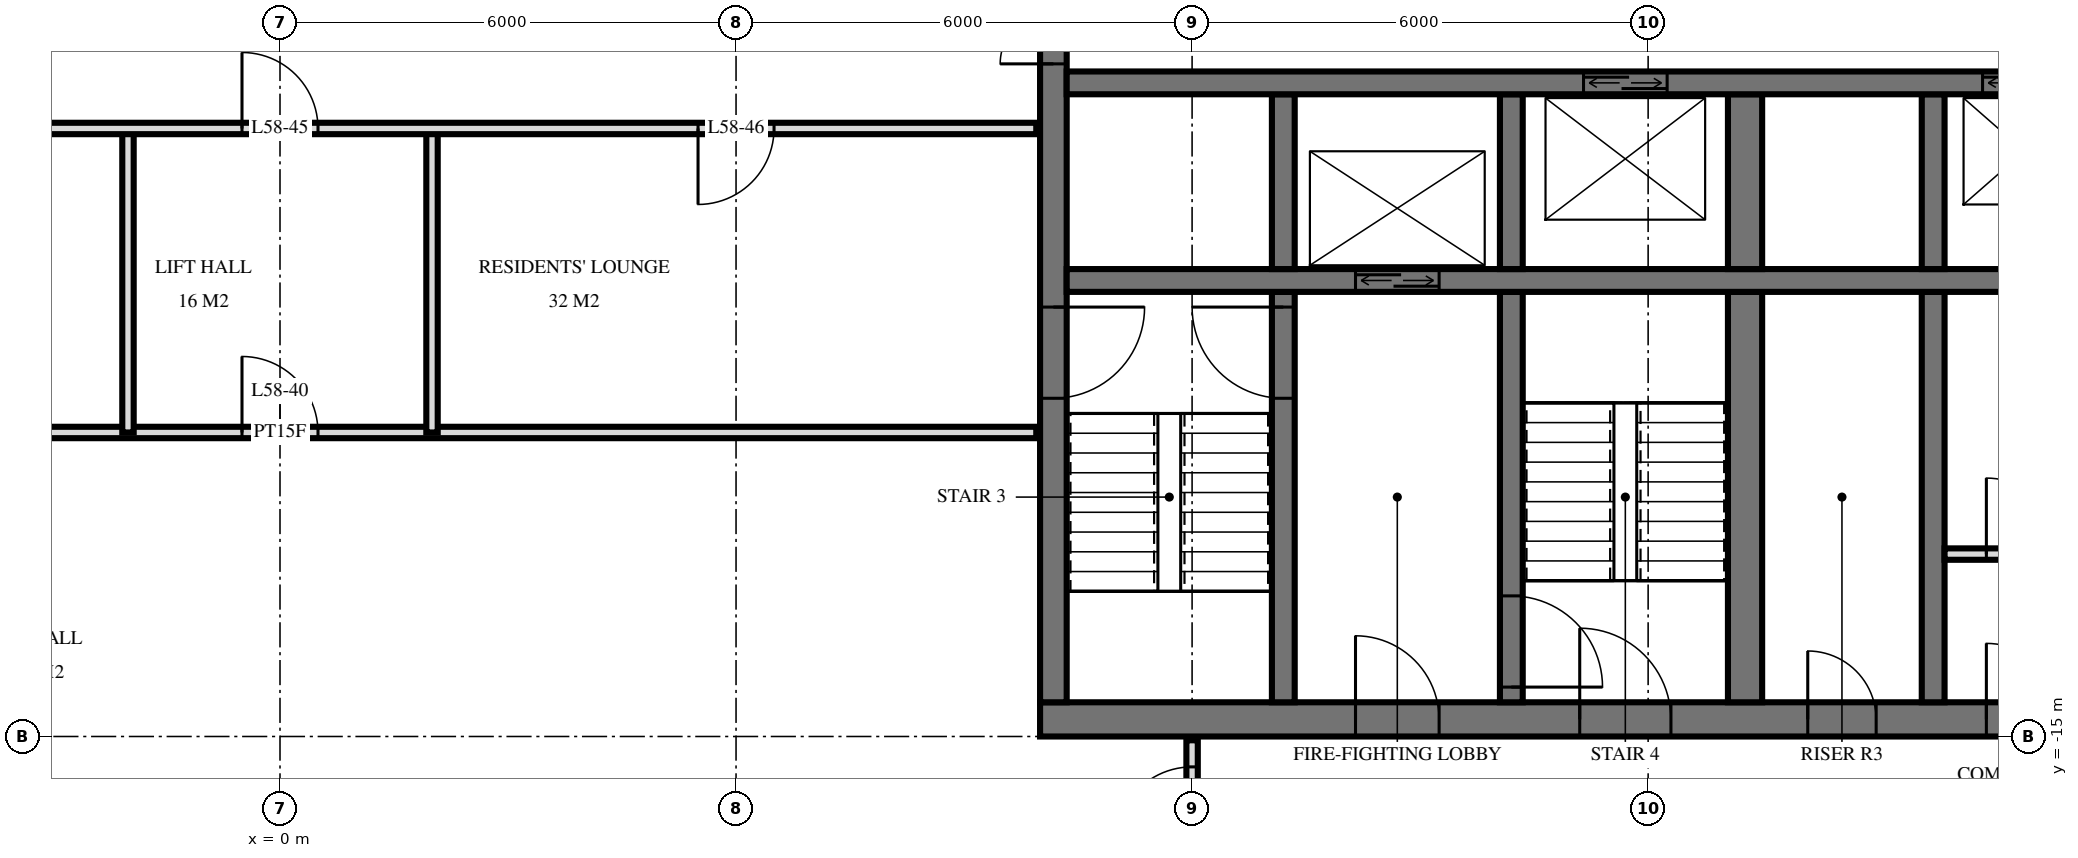
"""IFC4 building model, lengths in metres.
Left out: names, types, materials, properties, quantities, classifications, styles, units other than length and angle.
Written with IfcOpenShell. Run it as: python <this file> out.ifc"""

import sys

from ifc_helpers import new_model, si_unit, direction, frame, frame_2d, origin, place, context, subcontext, project, spatial, rectangle, extrude, element, fill, save


model = new_model("IFC4")
c1 = context("Model", 3, precision=1e-05, world=origin(), true_north=direction((0.0, 1.0)))
c2 = subcontext(c1, "Body", "Model", "MODEL_VIEW")
j1 = project(units=[si_unit("LENGTHUNIT", "METRE"), si_unit("PLANEANGLEUNIT", "RADIAN")], contexts=[c1])
p1 = place(None, origin())
s1 = spatial("IfcSite", under=j1, at=p1, CompositionType="ELEMENT")
p2 = place(p1, origin())
s2 = spatial("IfcBuilding", under=s1, at=p2, CompositionType="ELEMENT")
p3 = place(p2, frame((0.0, 0.0, 222.1)))
s3 = spatial("IfcBuildingStorey", under=s2, at=p3, CompositionType="ELEMENT", Elevation=222.1)
p4 = place(p3, frame((10.0, -14.775, 0.0), z_axis=(0.0, 0.0, 1.0), x_axis=(1.0, 0.0, 0.0)))
e1 = element("IfcWall", 1, at=p4, inside=s3, PredefinedType="SHEAR", context=c2, shape_type="SweptSolid", body=[
    extrude(rectangle(XDim=14.5, YDim=0.45, at=frame_2d((7.25, 0.0))), origin(), (0.0, 0.0, 1.0), 3.5),
])
p5 = place(p4, frame((7.1, 0.0, 0.0)))
e2 = element("IfcOpeningElement", 2, at=p5, cuts=e1, PredefinedType="OPENING", context=c2, shape_type="SweptSolid", body=[
    extrude(rectangle(XDim=1.2, YDim=2.1, at=frame_2d((0.6, 1.05))), frame((0.0, 0.235, 0.0), z_axis=(0.0, -1.0, 0.0), x_axis=(1.0, 0.0, 0.0)), (0.0, 0.0, 1.0), 0.47),
])
p6 = place(p4, frame((4.15, 0.0, 0.0)))
e3 = element("IfcOpeningElement", 3, at=p6, cuts=e1, PredefinedType="OPENING", context=c2, shape_type="SweptSolid", body=[
    extrude(rectangle(XDim=1.1, YDim=2.1, at=frame_2d((0.55, 1.05))), frame((0.0, 0.235, 0.0), z_axis=(0.0, -1.0, 0.0), x_axis=(1.0, 0.0, 0.0)), (0.0, 0.0, 1.0), 0.47),
])
p7 = place(p4, frame((10.1, 0.0, 0.0)))
e4 = element("IfcOpeningElement", 4, at=p7, cuts=e1, PredefinedType="OPENING", context=c2, shape_type="SweptSolid", body=[
    extrude(rectangle(XDim=0.9, YDim=2.1, at=frame_2d((0.45, 1.05))), frame((0.0, 0.235, 0.0), z_axis=(0.0, -1.0, 0.0), x_axis=(1.0, 0.0, 0.0)), (0.0, 0.0, 1.0), 0.47),
])
p8 = place(p4, frame((12.45, 0.0, 0.0)))
e5 = element("IfcOpeningElement", 5, at=p8, cuts=e1, PredefinedType="OPENING", context=c2, shape_type="SweptSolid", body=[
    extrude(rectangle(XDim=1.0, YDim=2.1, at=frame_2d((0.5, 1.05))), frame((0.0, 0.235, 0.0), z_axis=(0.0, -1.0, 0.0), x_axis=(1.0, 0.0, 0.0)), (0.0, 0.0, 1.0), 0.47),
])
p9 = place(p3, frame((10.175, -14.55, 0.0), z_axis=(0.0, 0.0, 1.0), x_axis=(0.0, 1.0, 0.0)))
e6 = element("IfcWall", 6, at=p9, inside=s3, PredefinedType="SHEAR", context=c2, shape_type="SweptSolid", body=[
    extrude(rectangle(XDim=14.1, YDim=0.35, at=frame_2d((7.05, 0.0))), origin(), (0.0, 0.0, 1.0), 3.5),
])
p10 = place(p9, frame((8.4, 0.0, 0.0)))
e7 = element("IfcOpeningElement", 7, at=p10, cuts=e6, PredefinedType="OPENING", context=c2, shape_type="SweptSolid", body=[
    extrude(rectangle(XDim=1.4, YDim=2.4, at=frame_2d((0.7, 1.2))), frame((0.0, 0.185, 0.0), z_axis=(0.0, -1.0, 0.0), x_axis=(1.0, 0.0, 0.0)), (0.0, 0.0, 1.0), 0.37),
])
p11 = place(p9, frame((10.0, 0.0, 0.0)))
e8 = element("IfcOpeningElement", 8, at=p11, cuts=e6, PredefinedType="OPENING", context=c2, shape_type="SweptSolid", body=[
    extrude(rectangle(XDim=1.4, YDim=2.4, at=frame_2d((0.7, 1.2))), frame((0.0, 0.185, 0.0), z_axis=(0.0, -1.0, 0.0), x_axis=(1.0, 0.0, 0.0)), (0.0, 0.0, 1.0), 0.37),
])
p12 = place(p9, frame((4.0, 0.0, 0.0)))
e9 = element("IfcOpeningElement", 9, at=p12, cuts=e6, PredefinedType="OPENING", context=c2, shape_type="SweptSolid", body=[
    extrude(rectangle(XDim=1.2, YDim=2.1, at=frame_2d((0.6, 1.05))), frame((0.0, 0.185, 0.0), z_axis=(0.0, -1.0, 0.0), x_axis=(1.0, 0.0, 0.0)), (0.0, 0.0, 1.0), 0.37),
])
p13 = place(p3, frame((10.35, -6.4, 0.0), z_axis=(0.0, 0.0, 1.0), x_axis=(1.0, 0.0, 0.0)))
e10 = element("IfcWall", 10, at=p13, inside=s3, PredefinedType="SHEAR", context=c2, shape_type="SweptSolid", body=[
    extrude(rectangle(XDim=13.7, YDim=0.3, at=frame_2d((6.85, 0.0))), origin(), (0.0, 0.0, 1.0), 3.5),
])
p14 = place(p13, frame((12.05, 0.0, 0.0)))
e11 = element("IfcOpeningElement", 11, at=p14, cuts=e10, PredefinedType="OPENING", context=c2, shape_type="SweptSolid", body=[
    extrude(rectangle(XDim=1.1, YDim=2.1, at=frame_2d((0.55, 1.05))), frame((0.0, 0.16, 0.0), z_axis=(0.0, -1.0, 0.0), x_axis=(1.0, 0.0, 0.0)), (0.0, 0.0, 1.0), 0.32),
])
p15 = place(p13, frame((6.8, 0.0, 0.0)))
e12 = element("IfcOpeningElement", 12, at=p15, cuts=e10, PredefinedType="OPENING", context=c2, shape_type="SweptSolid", body=[
    extrude(rectangle(XDim=1.1, YDim=2.1, at=frame_2d((0.55, 1.05))), frame((0.0, 0.16, 0.0), z_axis=(0.0, -1.0, 0.0), x_axis=(1.0, 0.0, 0.0)), (0.0, 0.0, 1.0), 0.32),
])
p16 = place(p3, frame((10.35, -9.0, 0.0), z_axis=(0.0, 0.0, 1.0), x_axis=(1.0, 0.0, 0.0)))
e13 = element("IfcWall", 13, at=p16, inside=s3, PredefinedType="SHEAR", context=c2, shape_type="SweptSolid", body=[
    extrude(rectangle(XDim=13.7, YDim=0.3, at=frame_2d((6.85, 0.0))), origin(), (0.0, 0.0, 1.0), 3.5),
])
p17 = place(p16, frame((3.8, 0.0, 0.0)))
e14 = element("IfcOpeningElement", 14, at=p17, cuts=e13, PredefinedType="OPENING", context=c2, shape_type="SweptSolid", body=[
    extrude(rectangle(XDim=1.1, YDim=2.1, at=frame_2d((0.55, 1.05))), frame((0.0, 0.16, 0.0), z_axis=(0.0, -1.0, 0.0), x_axis=(1.0, 0.0, 0.0)), (0.0, 0.0, 1.0), 0.32),
])
p18 = place(p3, frame((13.2, -8.85, 0.0), z_axis=(0.0, 0.0, 1.0), x_axis=(0.0, 1.0, 0.0)))
e15 = element("IfcWall", 15, at=p18, inside=s3, PredefinedType="SHEAR", context=c2, shape_type="SweptSolid", body=[
    extrude(rectangle(XDim=2.3, YDim=0.3, at=frame_2d((1.15, 0.0))), origin(), (0.0, 0.0, 1.0), 3.5),
])
p19 = place(p3, frame((13.2, -14.55, 0.0), z_axis=(0.0, 0.0, 1.0), x_axis=(0.0, 1.0, 0.0)))
e16 = element("IfcWall", 16, at=p19, inside=s3, PredefinedType="SHEAR", context=c2, shape_type="SweptSolid", body=[
    extrude(rectangle(XDim=5.4, YDim=0.3, at=frame_2d((2.7, 0.0))), origin(), (0.0, 0.0, 1.0), 3.5),
])
p20 = place(p19, frame((4.0, 0.0, 0.0)))
e17 = element("IfcOpeningElement", 17, at=p20, cuts=e16, PredefinedType="OPENING", context=c2, shape_type="SweptSolid", body=[
    extrude(rectangle(XDim=1.2, YDim=2.1, at=frame_2d((0.6, 1.05))), frame((0.0, 0.16, 0.0), z_axis=(0.0, -1.0, 0.0), x_axis=(1.0, 0.0, 0.0)), (0.0, 0.0, 1.0), 0.32),
])
p21 = place(p3, frame((16.2, -8.85, 0.0), z_axis=(0.0, 0.0, 1.0), x_axis=(0.0, 1.0, 0.0)))
e18 = element("IfcWall", 18, at=p21, inside=s3, PredefinedType="SHEAR", context=c2, shape_type="SweptSolid", body=[
    extrude(rectangle(XDim=2.3, YDim=0.3, at=frame_2d((1.15, 0.0))), origin(), (0.0, 0.0, 1.0), 3.5),
])
p22 = place(p3, frame((16.2, -14.55, 0.0), z_axis=(0.0, 0.0, 1.0), x_axis=(0.0, 1.0, 0.0)))
e19 = element("IfcWall", 19, at=p22, inside=s3, PredefinedType="SHEAR", context=c2, shape_type="SweptSolid", body=[
    extrude(rectangle(XDim=5.4, YDim=0.3, at=frame_2d((2.7, 0.0))), origin(), (0.0, 0.0, 1.0), 3.5),
])
p23 = place(p22, frame((0.2, 0.0, 0.0)))
e20 = element("IfcOpeningElement", 20, at=p23, cuts=e19, PredefinedType="OPENING", context=c2, shape_type="SweptSolid", body=[
    extrude(rectangle(XDim=1.2, YDim=2.1, at=frame_2d((0.6, 1.05))), frame((0.0, 0.16, 0.0), z_axis=(0.0, -1.0, 0.0), x_axis=(1.0, 0.0, 0.0)), (0.0, 0.0, 1.0), 0.32),
])
p24 = place(p3, frame((19.275, -8.85, 0.0), z_axis=(0.0, 0.0, 1.0), x_axis=(0.0, 1.0, 0.0)))
e21 = element("IfcWall", 21, at=p24, inside=s3, PredefinedType="SHEAR", context=c2, shape_type="SweptSolid", body=[
    extrude(rectangle(XDim=2.3, YDim=0.45, at=frame_2d((1.15, 0.0))), origin(), (0.0, 0.0, 1.0), 3.5),
])
p25 = place(p3, frame((19.275, -14.55, 0.0), z_axis=(0.0, 0.0, 1.0), x_axis=(0.0, 1.0, 0.0)))
e22 = element("IfcWall", 22, at=p25, inside=s3, PredefinedType="SHEAR", context=c2, shape_type="SweptSolid", body=[
    extrude(rectangle(XDim=5.4, YDim=0.45, at=frame_2d((2.7, 0.0))), origin(), (0.0, 0.0, 1.0), 3.5),
])
p26 = place(p3, frame((21.75, -8.85, 0.0), z_axis=(0.0, 0.0, 1.0), x_axis=(0.0, 1.0, 0.0)))
e23 = element("IfcWall", 23, at=p26, inside=s3, PredefinedType="SHEAR", context=c2, shape_type="SweptSolid", body=[
    extrude(rectangle(XDim=2.3, YDim=0.3, at=frame_2d((1.15, 0.0))), origin(), (0.0, 0.0, 1.0), 3.5),
])
p27 = place(p3, frame((21.75, -14.55, 0.0), z_axis=(0.0, 0.0, 1.0), x_axis=(0.0, 1.0, 0.0)))
e24 = element("IfcWall", 24, at=p27, inside=s3, PredefinedType="SHEAR", context=c2, shape_type="SweptSolid", body=[
    extrude(rectangle(XDim=5.4, YDim=0.3, at=frame_2d((2.7, 0.0))), origin(), (0.0, 0.0, 1.0), 3.5),
])
p28 = place(p3, frame((21.9, -12.6, 0.0), z_axis=(0.0, 0.0, 1.0), x_axis=(1.0, 0.0, 0.0)))
e25 = element("IfcWall", 25, at=p28, inside=s3, PredefinedType="PARTITIONING", context=c2, shape_type="SweptSolid", body=[
    extrude(rectangle(XDim=2.1, YDim=0.15, at=frame_2d((1.05, 0.0))), origin(), (0.0, 0.0, 1.0), 3.2),
])
p29 = place(p28, frame((0.55, 0.0, 0.0)))
e26 = element("IfcOpeningElement", 26, at=p29, cuts=e25, PredefinedType="OPENING", context=c2, shape_type="SweptSolid", body=[
    extrude(rectangle(XDim=1.0, YDim=2.1, at=frame_2d((0.5, 1.05))), frame((0.0, 0.085, 0.0), z_axis=(0.0, -1.0, 0.0), x_axis=(1.0, 0.0, 0.0)), (0.0, 0.0, 1.0), 0.17),
])
p30 = place(p3, frame((12.0, -16.8, 0.0), z_axis=(0.0, 0.0, 1.0), x_axis=(0.0, 1.0, 0.0)))
e27 = element("IfcWall", 27, at=p30, inside=s3, PredefinedType="PARTITIONING", context=c2, shape_type="SweptSolid", body=[
    extrude(rectangle(XDim=1.75, YDim=0.15, at=frame_2d((0.875, 0.0))), origin(), (0.0, 0.0, 1.0), 3.22),
])
p31 = place(p30, frame((0.4, 0.0, 0.0)))
e28 = element("IfcOpeningElement", 28, at=p31, cuts=e27, PredefinedType="OPENING", context=c2, shape_type="SweptSolid", body=[
    extrude(rectangle(XDim=1.0, YDim=2.1, at=frame_2d((0.5, 1.05))), frame((0.0, 0.085, 0.0), z_axis=(0.0, -1.0, 0.0), x_axis=(1.0, 0.0, 0.0)), (0.0, 0.0, 1.0), 0.17),
])
for number, where, z_axis, x_axis in (
    (29, (2.0, -11.0, 0.0), (0.0, 0.0, 1.0), (0.0, 1.0, 0.0)),
    (30, (-2.0, -11.0, 0.0), (0.0, 0.0, 1.0), (0.0, 1.0, 0.0)),
):
    element("IfcWall", number, at=place(p3, frame(where, z_axis=z_axis, x_axis=x_axis)), inside=s3, PredefinedType="PARTITIONING", context=c2, shape_type="SweptSolid", body=[
        extrude(rectangle(XDim=4.0, YDim=0.15, at=frame_2d((2.0, 0.0))), origin(), (0.0, 0.0, 1.0), 3.22),
    ])
p32 = place(p3, frame((-9.95, -11.0, 0.0), z_axis=(0.0, 0.0, 1.0), x_axis=(1.0, 0.0, 0.0)))
e31 = element("IfcWall", 31, at=p32, inside=s3, PredefinedType="PARTITIONING", context=c2, shape_type="SweptSolid", body=[
    extrude(rectangle(XDim=19.9, YDim=0.15, at=frame_2d((9.95, 0.0))), origin(), (0.0, 0.0, 1.0), 3.22),
])
p33 = place(p32, frame((9.45, 0.0, 0.0)))
e32 = element("IfcOpeningElement", 32, at=p33, cuts=e31, PredefinedType="OPENING", context=c2, shape_type="SweptSolid", body=[
    extrude(rectangle(XDim=1.0, YDim=2.1, at=frame_2d((0.5, 1.05))), frame((0.0, 0.085, 0.0), z_axis=(0.0, -1.0, 0.0), x_axis=(1.0, 0.0, 0.0)), (0.0, 0.0, 1.0), 0.17),
])
p34 = place(p32, frame((3.45, 0.0, 0.0)))
e33 = element("IfcOpeningElement", 33, at=p34, cuts=e31, PredefinedType="OPENING", context=c2, shape_type="SweptSolid", body=[
    extrude(rectangle(XDim=1.0, YDim=2.1, at=frame_2d((0.5, 1.05))), frame((0.0, 0.085, 0.0), z_axis=(0.0, -1.0, 0.0), x_axis=(1.0, 0.0, 0.0)), (0.0, 0.0, 1.0), 0.17),
])
p35 = place(p3, frame((-9.95, -7.0, 0.0), z_axis=(0.0, 0.0, 1.0), x_axis=(1.0, 0.0, 0.0)))
e34 = element("IfcWall", 34, at=p35, inside=s3, PredefinedType="PARTITIONING", context=c2, shape_type="SweptSolid", body=[
    extrude(rectangle(XDim=19.9, YDim=0.15, at=frame_2d((9.95, 0.0))), origin(), (0.0, 0.0, 1.0), 3.22),
])
p36 = place(p35, frame((9.45, 0.0, 0.0)))
e35 = element("IfcOpeningElement", 35, at=p36, cuts=e34, PredefinedType="OPENING", context=c2, shape_type="SweptSolid", body=[
    extrude(rectangle(XDim=1.0, YDim=2.1, at=frame_2d((0.5, 1.05))), frame((0.0, 0.085, 0.0), z_axis=(0.0, -1.0, 0.0), x_axis=(1.0, 0.0, 0.0)), (0.0, 0.0, 1.0), 0.17),
])
p37 = place(p35, frame((15.45, 0.0, 0.0)))
e36 = element("IfcOpeningElement", 36, at=p37, cuts=e34, PredefinedType="OPENING", context=c2, shape_type="SweptSolid", body=[
    extrude(rectangle(XDim=1.0, YDim=2.1, at=frame_2d((0.5, 1.05))), frame((0.0, 0.085, 0.0), z_axis=(0.0, -1.0, 0.0), x_axis=(1.0, 0.0, 0.0)), (0.0, 0.0, 1.0), 0.17),
])
p38 = place(p14, origin())
e37 = element("IfcDoor", 37, at=p38, inside=s3, OperationType="DOUBLE_DOOR_SLIDING", PredefinedType="USERDEFINED", context=c2, shape_type="SweptSolid", body=[
    extrude(rectangle(XDim=1.1, YDim=2.1, at=frame_2d((0.55, 1.05))), frame((0.0, 0.025, 0.0), z_axis=(0.0, -1.0, 0.0), x_axis=(1.0, 0.0, 0.0)), (0.0, 0.0, 1.0), 0.05),
])
fill(e11, e37)
p39 = place(p17, origin())
e38 = element("IfcDoor", 38, at=p39, inside=s3, OperationType="DOUBLE_DOOR_SLIDING", PredefinedType="USERDEFINED", context=c2, shape_type="SweptSolid", body=[
    extrude(rectangle(XDim=1.1, YDim=2.1, at=frame_2d((0.55, 1.05))), frame((0.0, 0.025, 0.0), z_axis=(0.0, -1.0, 0.0), x_axis=(1.0, 0.0, 0.0)), (0.0, 0.0, 1.0), 0.05),
])
fill(e14, e38)
p40 = place(p15, origin())
e39 = element("IfcDoor", 39, at=p40, inside=s3, OperationType="DOUBLE_DOOR_SLIDING", PredefinedType="USERDEFINED", context=c2, shape_type="SweptSolid", body=[
    extrude(rectangle(XDim=1.1, YDim=2.1, at=frame_2d((0.55, 1.05))), frame((0.0, 0.025, 0.0), z_axis=(0.0, -1.0, 0.0), x_axis=(1.0, 0.0, 0.0)), (0.0, 0.0, 1.0), 0.05),
])
fill(e12, e39)
p41 = place(p10, origin())
e40 = element("IfcDoor", 40, at=p41, inside=s3, OperationType="DOUBLE_DOOR_SINGLE_SWING", PredefinedType="DOOR", context=c2, shape_type="SweptSolid", body=[
    extrude(rectangle(XDim=1.4, YDim=2.4, at=frame_2d((0.7, 1.2))), frame((0.0, 0.025, 0.0), z_axis=(0.0, -1.0, 0.0), x_axis=(1.0, 0.0, 0.0)), (0.0, 0.0, 1.0), 0.05),
])
fill(e7, e40)
p42 = place(p12, frame((0.6, 0.0, 0.0), z_axis=(0.0, 0.0, 1.0), x_axis=(-1.0, 0.0, 0.0)))
e41 = element("IfcDoor", 41, at=p42, inside=s3, OperationType="SINGLE_SWING_RIGHT", PredefinedType="DOOR", context=c2, shape_type="SweptSolid", body=[
    extrude(rectangle(XDim=1.2, YDim=2.1, at=frame_2d((0.0, 1.05))), frame((0.0, -0.025, 0.0), z_axis=(0.0, 1.0, 0.0), x_axis=(-1.0, 0.0, 0.0)), (0.0, 0.0, 1.0), 0.05),
])
fill(e9, e41)
p43 = place(p5, origin())
e42 = element("IfcDoor", 42, at=p43, inside=s3, OperationType="SINGLE_SWING_RIGHT", PredefinedType="DOOR", context=c2, shape_type="SweptSolid", body=[
    extrude(rectangle(XDim=1.2, YDim=2.1, at=frame_2d((0.6, 1.05))), frame((0.0, 0.025, 0.0), z_axis=(0.0, -1.0, 0.0), x_axis=(1.0, 0.0, 0.0)), (0.0, 0.0, 1.0), 0.05),
])
fill(e2, e42)
p44 = place(p6, origin())
e43 = element("IfcDoor", 43, at=p44, inside=s3, OperationType="SINGLE_SWING_RIGHT", PredefinedType="DOOR", context=c2, shape_type="SweptSolid", body=[
    extrude(rectangle(XDim=1.1, YDim=2.1, at=frame_2d((0.55, 1.05))), frame((0.0, 0.025, 0.0), z_axis=(0.0, -1.0, 0.0), x_axis=(1.0, 0.0, 0.0)), (0.0, 0.0, 1.0), 0.05),
])
fill(e3, e43)
p45 = place(p7, origin())
e44 = element("IfcDoor", 44, at=p45, inside=s3, OperationType="SINGLE_SWING_RIGHT", PredefinedType="DOOR", context=c2, shape_type="SweptSolid", body=[
    extrude(rectangle(XDim=0.9, YDim=2.1, at=frame_2d((0.45, 1.05))), frame((0.0, 0.025, 0.0), z_axis=(0.0, -1.0, 0.0), x_axis=(1.0, 0.0, 0.0)), (0.0, 0.0, 1.0), 0.05),
])
fill(e4, e44)
p46 = place(p8, origin())
e45 = element("IfcDoor", 45, at=p46, inside=s3, OperationType="SINGLE_SWING_RIGHT", PredefinedType="DOOR", context=c2, shape_type="SweptSolid", body=[
    extrude(rectangle(XDim=1.0, YDim=2.1, at=frame_2d((0.5, 1.05))), frame((0.0, 0.025, 0.0), z_axis=(0.0, -1.0, 0.0), x_axis=(1.0, 0.0, 0.0)), (0.0, 0.0, 1.0), 0.05),
])
fill(e5, e45)
p47 = place(p20, origin())
e46 = element("IfcDoor", 46, at=p47, inside=s3, OperationType="SINGLE_SWING_LEFT", PredefinedType="DOOR", context=c2, shape_type="SweptSolid", body=[
    extrude(rectangle(XDim=1.2, YDim=2.1, at=frame_2d((0.6, 1.05))), frame((0.0, 0.025, 0.0), z_axis=(0.0, -1.0, 0.0), x_axis=(1.0, 0.0, 0.0)), (0.0, 0.0, 1.0), 0.05),
])
fill(e17, e46)
p48 = place(p23, frame((0.6, 0.0, 0.0), z_axis=(0.0, 0.0, 1.0), x_axis=(-1.0, 0.0, 0.0)))
e47 = element("IfcDoor", 47, at=p48, inside=s3, OperationType="SINGLE_SWING_LEFT", PredefinedType="DOOR", context=c2, shape_type="SweptSolid", body=[
    extrude(rectangle(XDim=1.2, YDim=2.1, at=frame_2d((0.0, 1.05))), frame((0.0, -0.025, 0.0), z_axis=(0.0, 1.0, 0.0), x_axis=(-1.0, 0.0, 0.0)), (0.0, 0.0, 1.0), 0.05),
])
fill(e20, e47)
p49 = place(p29, origin())
e48 = element("IfcDoor", 48, at=p49, inside=s3, OperationType="SINGLE_SWING_RIGHT", PredefinedType="DOOR", context=c2, shape_type="SweptSolid", body=[
    extrude(rectangle(XDim=1.0, YDim=2.1, at=frame_2d((0.5, 1.05))), frame((0.0, 0.025, 0.0), z_axis=(0.0, -1.0, 0.0), x_axis=(1.0, 0.0, 0.0)), (0.0, 0.0, 1.0), 0.05),
])
fill(e26, e48)
p50 = place(p31, origin())
e49 = element("IfcDoor", 49, at=p50, inside=s3, OperationType="SINGLE_SWING_RIGHT", PredefinedType="DOOR", context=c2, shape_type="SweptSolid", body=[
    extrude(rectangle(XDim=1.0, YDim=2.1, at=frame_2d((0.5, 1.05))), frame((0.0, 0.025, 0.0), z_axis=(0.0, -1.0, 0.0), x_axis=(1.0, 0.0, 0.0)), (0.0, 0.0, 1.0), 0.05),
])
fill(e28, e49)
p51 = place(p33, origin())
e50 = element("IfcDoor", 50, at=p51, inside=s3, OperationType="SINGLE_SWING_RIGHT", PredefinedType="DOOR", context=c2, shape_type="SweptSolid", body=[
    extrude(rectangle(XDim=1.0, YDim=2.1, at=frame_2d((0.5, 1.05))), frame((0.0, 0.025, 0.0), z_axis=(0.0, -1.0, 0.0), x_axis=(1.0, 0.0, 0.0)), (0.0, 0.0, 1.0), 0.05),
])
fill(e32, e50)
p52 = place(p36, origin())
e51 = element("IfcDoor", 51, at=p52, inside=s3, OperationType="SINGLE_SWING_RIGHT", PredefinedType="DOOR", context=c2, shape_type="SweptSolid", body=[
    extrude(rectangle(XDim=1.0, YDim=2.1, at=frame_2d((0.5, 1.05))), frame((0.0, 0.025, 0.0), z_axis=(0.0, -1.0, 0.0), x_axis=(1.0, 0.0, 0.0)), (0.0, 0.0, 1.0), 0.05),
])
fill(e35, e51)
p53 = place(p37, frame((0.5, 0.0, 0.0), z_axis=(0.0, 0.0, 1.0), x_axis=(-1.0, 0.0, 0.0)))
e52 = element("IfcDoor", 52, at=p53, inside=s3, OperationType="SINGLE_SWING_LEFT", PredefinedType="DOOR", context=c2, shape_type="SweptSolid", body=[
    extrude(rectangle(XDim=1.0, YDim=2.1, at=frame_2d((0.0, 1.05))), frame((0.0, -0.025, 0.0), z_axis=(0.0, 1.0, 0.0), x_axis=(-1.0, 0.0, 0.0)), (0.0, 0.0, 1.0), 0.05),
])
fill(e36, e52)
save(model, sys.argv[1])
